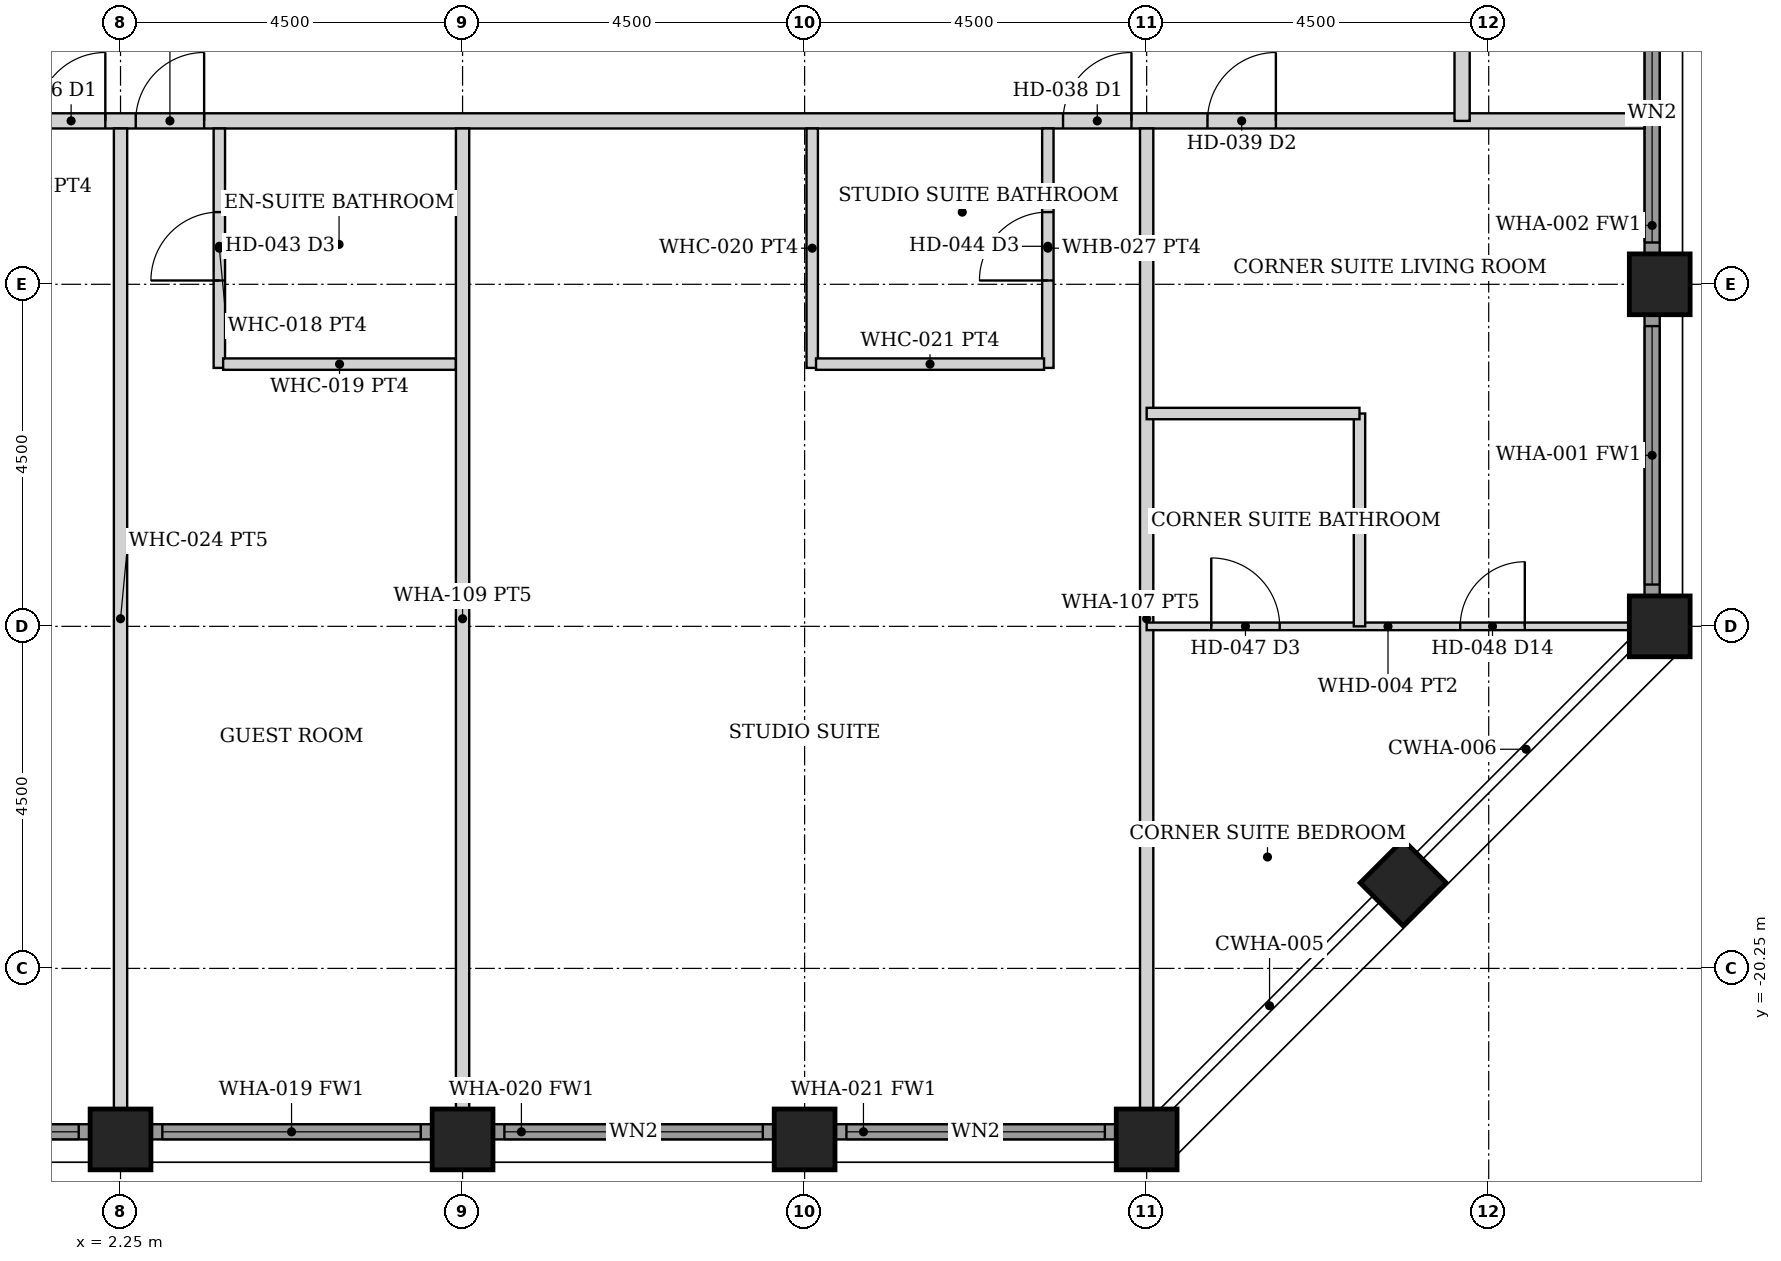
"""IFC4 building model, lengths in metres.
Left out: names, types, materials, properties, quantities, classifications, styles, units other than length and angle.
Written with IfcOpenShell. Run it as: python <this file> out.ifc"""

import sys

from ifc_helpers import new_model, si_unit, direction, frame, frame_2d, origin, origin_2d, place, context, subcontext, project, spatial, rectangle, hollow_rectangle, extrude, element, fill, save


model = new_model("IFC4")
c1 = context("Model", 3, precision=1e-05, world=origin(), true_north=direction((0.0, 1.0)))
c2 = subcontext(c1, "Body", "Model", "MODEL_VIEW")
j1 = project(units=[si_unit("LENGTHUNIT", "METRE"), si_unit("PLANEANGLEUNIT", "RADIAN")], contexts=[c1])
p1 = place(None, origin())
s1 = spatial("IfcSite", under=j1, at=p1, CompositionType="ELEMENT")
p2 = place(p1, origin())
s2 = spatial("IfcBuilding", under=s1, at=p2, CompositionType="ELEMENT")
p3 = place(p2, frame((0.0, 0.0, 150.8)))
s3 = spatial("IfcBuildingStorey", under=s2, at=p3, CompositionType="ELEMENT", Elevation=150.8)
for number, where, z_axis, x_axis in (
    (1, (22.5, -15.75, 0.0), (0.0, 0.0, 1.0), (1.0, 0.0, 0.0)),
    (2, (22.5, -11.25, 0.0), (0.0, 0.0, 1.0), (1.0, 0.0, 0.0)),
    (3, (2.25, -22.5, 0.0), (0.0, 0.0, 1.0), (0.0, 1.0, 0.0)),
    (4, (6.75, -22.5, 0.0), (0.0, 0.0, 1.0), (0.0, 1.0, 0.0)),
    (5, (11.25, -22.5, 0.0), (0.0, 0.0, 1.0), (0.0, 1.0, 0.0)),
    (6, (15.75, -22.5, 0.0), (0.0, 0.0, 1.0), (0.0, 1.0, 0.0)),
    (7, (19.125, -19.125, 0.0), (0.0, 0.0, 1.0), (0.707, -0.707, 0.0)),
):
    element("IfcColumn", number, at=place(p3, frame(where, z_axis=z_axis, x_axis=x_axis)), inside=s3, PredefinedType="COLUMN", context=c2, shape_type="SweptSolid", body=[
        extrude(hollow_rectangle(XDim=0.8, YDim=0.8, WallThickness=0.05, at=origin_2d()), origin(), (0.0, 0.0, 1.0), 3.6),
    ])
p4 = place(p3, frame((-1.845, -22.4, 0.0), z_axis=(0.0, 0.0, 1.0), x_axis=(1.0, 0.0, 0.0)))
e8 = element("IfcWall", 8, at=p4, inside=s3, PredefinedType="SOLIDWALL", context=c2, shape_type="SweptSolid", body=[
    extrude(rectangle(XDim=3.69, YDim=0.2, at=frame_2d((1.845, 0.0))), origin(), (0.0, 0.0, 1.0), 2.479),
])
p5 = place(p4, frame((0.145, 0.0, 0.3)))
e9 = element("IfcOpeningElement", 9, at=p5, cuts=e8, PredefinedType="OPENING", context=c2, shape_type="SweptSolid", body=[
    extrude(rectangle(XDim=3.4, YDim=2.029, at=frame_2d((1.7, 1.015))), frame((0.0, 0.11, 0.0), z_axis=(0.0, -1.0, 0.0), x_axis=(1.0, 0.0, 0.0)), (0.0, 0.0, 1.0), 0.22),
])
p6 = place(p3, frame((2.655, -22.4, 0.0), z_axis=(0.0, 0.0, 1.0), x_axis=(1.0, 0.0, 0.0)))
e10 = element("IfcWall", 10, at=p6, inside=s3, PredefinedType="SOLIDWALL", context=c2, shape_type="SweptSolid", body=[
    extrude(rectangle(XDim=3.69, YDim=0.2, at=frame_2d((1.845, 0.0))), origin(), (0.0, 0.0, 1.0), 2.479),
])
p7 = place(p6, frame((0.145, 0.0, 0.3)))
e11 = element("IfcOpeningElement", 11, at=p7, cuts=e10, PredefinedType="OPENING", context=c2, shape_type="SweptSolid", body=[
    extrude(rectangle(XDim=3.4, YDim=2.029, at=frame_2d((1.7, 1.015))), frame((0.0, 0.11, 0.0), z_axis=(0.0, -1.0, 0.0), x_axis=(1.0, 0.0, 0.0)), (0.0, 0.0, 1.0), 0.22),
])
p8 = place(p3, frame((7.155, -22.4, 0.0), z_axis=(0.0, 0.0, 1.0), x_axis=(1.0, 0.0, 0.0)))
e12 = element("IfcWall", 12, at=p8, inside=s3, PredefinedType="SOLIDWALL", context=c2, shape_type="SweptSolid", body=[
    extrude(rectangle(XDim=3.69, YDim=0.2, at=frame_2d((1.845, 0.0))), origin(), (0.0, 0.0, 1.0), 2.479),
])
p9 = place(p8, frame((0.145, 0.0, 0.3)))
e13 = element("IfcOpeningElement", 13, at=p9, cuts=e12, PredefinedType="OPENING", context=c2, shape_type="SweptSolid", body=[
    extrude(rectangle(XDim=3.4, YDim=2.029, at=frame_2d((1.7, 1.015))), frame((0.0, 0.11, 0.0), z_axis=(0.0, -1.0, 0.0), x_axis=(1.0, 0.0, 0.0)), (0.0, 0.0, 1.0), 0.22),
])
p10 = place(p3, frame((11.655, -22.4, 0.0), z_axis=(0.0, 0.0, 1.0), x_axis=(1.0, 0.0, 0.0)))
e14 = element("IfcWall", 14, at=p10, inside=s3, PredefinedType="SOLIDWALL", context=c2, shape_type="SweptSolid", body=[
    extrude(rectangle(XDim=3.69, YDim=0.2, at=frame_2d((1.845, 0.0))), origin(), (0.0, 0.0, 1.0), 2.479),
])
p11 = place(p10, frame((0.145, 0.0, 0.3)))
e15 = element("IfcOpeningElement", 15, at=p11, cuts=e14, PredefinedType="OPENING", context=c2, shape_type="SweptSolid", body=[
    extrude(rectangle(XDim=3.4, YDim=2.029, at=frame_2d((1.7, 1.015))), frame((0.0, 0.11, 0.0), z_axis=(0.0, -1.0, 0.0), x_axis=(1.0, 0.0, 0.0)), (0.0, 0.0, 1.0), 0.22),
])
p12 = place(p3, frame((22.4, -15.345, 0.0), z_axis=(0.0, 0.0, 1.0), x_axis=(0.0, 1.0, 0.0)))
e16 = element("IfcWall", 16, at=p12, inside=s3, PredefinedType="SOLIDWALL", context=c2, shape_type="SweptSolid", body=[
    extrude(rectangle(XDim=3.69, YDim=0.2, at=frame_2d((1.845, 0.0))), origin(), (0.0, 0.0, 1.0), 2.479),
])
p13 = place(p12, frame((0.145, 0.0, 0.3)))
e17 = element("IfcOpeningElement", 17, at=p13, cuts=e16, PredefinedType="OPENING", context=c2, shape_type="SweptSolid", body=[
    extrude(rectangle(XDim=3.4, YDim=2.029, at=frame_2d((1.7, 1.015))), frame((0.0, 0.11, 0.0), z_axis=(0.0, -1.0, 0.0), x_axis=(1.0, 0.0, 0.0)), (0.0, 0.0, 1.0), 0.22),
])
p14 = place(p3, frame((22.4, -10.845, 0.0), z_axis=(0.0, 0.0, 1.0), x_axis=(0.0, 1.0, 0.0)))
e18 = element("IfcWall", 18, at=p14, inside=s3, PredefinedType="SOLIDWALL", context=c2, shape_type="SweptSolid", body=[
    extrude(rectangle(XDim=3.69, YDim=0.2, at=frame_2d((1.845, 0.0))), origin(), (0.0, 0.0, 1.0), 2.479),
])
p15 = place(p14, frame((0.145, 0.0, 0.3)))
e19 = element("IfcOpeningElement", 19, at=p15, cuts=e18, PredefinedType="OPENING", context=c2, shape_type="SweptSolid", body=[
    extrude(rectangle(XDim=3.4, YDim=2.029, at=frame_2d((1.7, 1.015))), frame((0.0, 0.11, 0.0), z_axis=(0.0, -1.0, 0.0), x_axis=(1.0, 0.0, 0.0)), (0.0, 0.0, 1.0), 0.22),
])
p16 = place(p3, frame((-22.3, -9.1, 0.0), z_axis=(0.0, 0.0, 1.0), x_axis=(1.0, 0.0, 0.0)))
e20 = element("IfcWall", 20, at=p16, inside=s3, PredefinedType="PARTITIONING", context=c2, shape_type="SweptSolid", body=[
    extrude(rectangle(XDim=44.6, YDim=0.2, at=frame_2d((22.3, 0.0))), origin(), (0.0, 0.0, 1.0), 2.473),
])
p17 = place(p16, frame((6.75, 0.0, 0.0)))
e21 = element("IfcOpeningElement", 21, at=p17, cuts=e20, PredefinedType="OPENING", context=c2, shape_type="SweptSolid", body=[
    extrude(rectangle(XDim=0.9, YDim=2.1, at=frame_2d((0.45, 1.05))), frame((0.0, 0.11, 0.0), z_axis=(0.0, -1.0, 0.0), x_axis=(1.0, 0.0, 0.0)), (0.0, 0.0, 1.0), 0.22),
])
p18 = place(p16, frame((15.75, 0.0, 0.0)))
e22 = element("IfcOpeningElement", 22, at=p18, cuts=e20, PredefinedType="OPENING", context=c2, shape_type="SweptSolid", body=[
    extrude(rectangle(XDim=0.9, YDim=2.1, at=frame_2d((0.45, 1.05))), frame((0.0, 0.11, 0.0), z_axis=(0.0, -1.0, 0.0), x_axis=(1.0, 0.0, 0.0)), (0.0, 0.0, 1.0), 0.22),
])
p19 = place(p16, frame((23.45, 0.0, 0.0)))
e23 = element("IfcOpeningElement", 23, at=p19, cuts=e20, PredefinedType="OPENING", context=c2, shape_type="SweptSolid", body=[
    extrude(rectangle(XDim=0.9, YDim=2.1, at=frame_2d((0.45, 1.05))), frame((0.0, 0.11, 0.0), z_axis=(0.0, -1.0, 0.0), x_axis=(1.0, 0.0, 0.0)), (0.0, 0.0, 1.0), 0.22),
])
p20 = place(p16, frame((24.75, 0.0, 0.0)))
e24 = element("IfcOpeningElement", 24, at=p20, cuts=e20, PredefinedType="OPENING", context=c2, shape_type="SweptSolid", body=[
    extrude(rectangle(XDim=0.9, YDim=2.1, at=frame_2d((0.45, 1.05))), frame((0.0, 0.11, 0.0), z_axis=(0.0, -1.0, 0.0), x_axis=(1.0, 0.0, 0.0)), (0.0, 0.0, 1.0), 0.22),
])
p21 = place(p16, frame((36.95, 0.0, 0.0)))
e25 = element("IfcOpeningElement", 25, at=p21, cuts=e20, PredefinedType="OPENING", context=c2, shape_type="SweptSolid", body=[
    extrude(rectangle(XDim=0.9, YDim=2.1, at=frame_2d((0.45, 1.05))), frame((0.0, 0.11, 0.0), z_axis=(0.0, -1.0, 0.0), x_axis=(1.0, 0.0, 0.0)), (0.0, 0.0, 1.0), 0.22),
])
p22 = place(p16, frame((38.85, 0.0, 0.0)))
e26 = element("IfcOpeningElement", 26, at=p22, cuts=e20, PredefinedType="OPENING", context=c2, shape_type="SweptSolid", body=[
    extrude(rectangle(XDim=0.9, YDim=2.1, at=frame_2d((0.45, 1.05))), frame((0.0, 0.11, 0.0), z_axis=(0.0, -1.0, 0.0), x_axis=(1.0, 0.0, 0.0)), (0.0, 0.0, 1.0), 0.22),
])
p23 = place(p16, frame((4.85, 0.0, 0.0)))
e27 = element("IfcOpeningElement", 27, at=p23, cuts=e20, PredefinedType="OPENING", context=c2, shape_type="SweptSolid", body=[
    extrude(rectangle(XDim=0.9, YDim=2.1, at=frame_2d((0.45, 1.05))), frame((0.0, 0.11, 0.0), z_axis=(0.0, -1.0, 0.0), x_axis=(1.0, 0.0, 0.0)), (0.0, 0.0, 1.0), 0.22),
])
p24 = place(p3, frame((19.9, -9.1, 0.0), z_axis=(0.0, 0.0, 1.0), x_axis=(0.0, 1.0, 0.0)))
e28 = element("IfcWall", 28, at=p24, inside=s3, PredefinedType="PARTITIONING", context=c2, shape_type="SweptSolid", body=[
    extrude(rectangle(XDim=6.9, YDim=0.2, at=frame_2d((3.45, 0.0))), origin(), (0.0, 0.0, 1.0), 2.473),
])
p25 = place(p24, frame((3.075, 0.0, 0.0)))
e29 = element("IfcOpeningElement", 29, at=p25, cuts=e28, PredefinedType="OPENING", context=c2, shape_type="SweptSolid", body=[
    extrude(rectangle(XDim=0.8, YDim=2.1, at=frame_2d((0.4, 1.05))), frame((0.0, 0.11, 0.0), z_axis=(0.0, -1.0, 0.0), x_axis=(1.0, 0.0, 0.0)), (0.0, 0.0, 1.0), 0.22),
])
p26 = place(p3, frame((3.55, -12.35, 0.0), z_axis=(0.0, 0.0, 1.0), x_axis=(0.0, 1.0, 0.0)))
e30 = element("IfcWall", 30, at=p26, inside=s3, PredefinedType="PARTITIONING", context=c2, shape_type="SweptSolid", body=[
    extrude(rectangle(XDim=3.15, YDim=0.15, at=frame_2d((1.575, 0.0))), origin(), (0.0, 0.0, 1.0), 2.473),
])
p27 = place(p26, frame((1.15, 0.0, 0.0)))
e31 = element("IfcOpeningElement", 31, at=p27, cuts=e30, PredefinedType="OPENING", context=c2, shape_type="SweptSolid", body=[
    extrude(rectangle(XDim=0.9, YDim=2.1, at=frame_2d((0.45, 1.05))), frame((0.0, 0.085, 0.0), z_axis=(0.0, -1.0, 0.0), x_axis=(1.0, 0.0, 0.0)), (0.0, 0.0, 1.0), 0.17),
])
p28 = place(p3, frame((3.6, -12.3, 0.0), z_axis=(0.0, 0.0, 1.0), x_axis=(1.0, 0.0, 0.0)))
e32 = element("IfcWall", 32, at=p28, inside=s3, PredefinedType="PARTITIONING", context=c2, shape_type="SweptSolid", body=[
    extrude(rectangle(XDim=3.062, YDim=0.15, at=frame_2d((1.531, 0.0))), origin(), (0.0, 0.0, 1.0), 2.473),
])
p29 = place(p3, frame((14.45, -12.35, 0.0), z_axis=(0.0, 0.0, 1.0), x_axis=(0.0, 1.0, 0.0)))
e33 = element("IfcWall", 33, at=p29, inside=s3, PredefinedType="PARTITIONING", context=c2, shape_type="SweptSolid", body=[
    extrude(rectangle(XDim=3.15, YDim=0.15, at=frame_2d((1.575, 0.0))), origin(), (0.0, 0.0, 1.0), 2.473),
])
p30 = place(p29, frame((1.15, 0.0, 0.0)))
e34 = element("IfcOpeningElement", 34, at=p30, cuts=e33, PredefinedType="OPENING", context=c2, shape_type="SweptSolid", body=[
    extrude(rectangle(XDim=0.9, YDim=2.1, at=frame_2d((0.45, 1.05))), frame((0.0, 0.085, 0.0), z_axis=(0.0, -1.0, 0.0), x_axis=(1.0, 0.0, 0.0)), (0.0, 0.0, 1.0), 0.17),
])
p31 = place(p3, frame((11.35, -12.35, 0.0), z_axis=(0.0, 0.0, 1.0), x_axis=(0.0, 1.0, 0.0)))
e35 = element("IfcWall", 35, at=p31, inside=s3, PredefinedType="PARTITIONING", context=c2, shape_type="SweptSolid", body=[
    extrude(rectangle(XDim=3.15, YDim=0.15, at=frame_2d((1.575, 0.0))), origin(), (0.0, 0.0, 1.0), 2.473),
])
p32 = place(p3, frame((11.4, -12.3, 0.0), z_axis=(0.0, 0.0, 1.0), x_axis=(1.0, 0.0, 0.0)))
e36 = element("IfcWall", 36, at=p32, inside=s3, PredefinedType="PARTITIONING", context=c2, shape_type="SweptSolid", body=[
    extrude(rectangle(XDim=3.0, YDim=0.15, at=frame_2d((1.5, 0.0))), origin(), (0.0, 0.0, 1.0), 2.473),
])
for number, where, z_axis, x_axis in (
    (37, (2.25, -22.1, 0.0), (0.0, 0.0, 1.0), (0.0, 1.0, 0.0)),
    (38, (6.75, -22.1, 0.0), (0.0, 0.0, 1.0), (0.0, 1.0, 0.0)),
    (39, (15.75, -22.1, 0.0), (0.0, 0.0, 1.0), (0.0, 1.0, 0.0)),
):
    element("IfcWall", number, at=place(p3, frame(where, z_axis=z_axis, x_axis=x_axis)), inside=s3, PredefinedType="PARTITIONING", context=c2, shape_type="SweptSolid", body=[
        extrude(rectangle(XDim=12.9, YDim=0.175, at=frame_2d((6.45, 0.0))), origin(), (0.0, 0.0, 1.0), 2.473),
    ])
p33 = place(p3, frame((15.75, -15.75, 0.0), z_axis=(0.0, 0.0, 1.0), x_axis=(1.0, 0.0, 0.0)))
e40 = element("IfcWall", 40, at=p33, inside=s3, PredefinedType="PARTITIONING", context=c2, shape_type="SweptSolid", body=[
    extrude(rectangle(XDim=6.35, YDim=0.1, at=frame_2d((3.175, 0.0))), origin(), (0.0, 0.0, 1.0), 2.473),
])
p34 = place(p33, frame((4.125, 0.0, 0.0)))
e41 = element("IfcOpeningElement", 41, at=p34, cuts=e40, PredefinedType="OPENING", context=c2, shape_type="SweptSolid", body=[
    extrude(rectangle(XDim=0.85, YDim=2.1, at=frame_2d((0.425, 1.05))), frame((0.0, 0.06, 0.0), z_axis=(0.0, -1.0, 0.0), x_axis=(1.0, 0.0, 0.0)), (0.0, 0.0, 1.0), 0.12),
])
p35 = place(p33, frame((0.85, 0.0, 0.0)))
e42 = element("IfcOpeningElement", 42, at=p35, cuts=e40, PredefinedType="OPENING", context=c2, shape_type="SweptSolid", body=[
    extrude(rectangle(XDim=0.9, YDim=2.1, at=frame_2d((0.45, 1.05))), frame((0.0, 0.06, 0.0), z_axis=(0.0, -1.0, 0.0), x_axis=(1.0, 0.0, 0.0)), (0.0, 0.0, 1.0), 0.12),
])
for number, where, z_axis, x_axis in (
    (43, (18.55, -15.75, 0.0), (0.0, 0.0, 1.0), (0.0, 1.0, 0.0)),
    (44, (15.75, -12.95, 0.0), (0.0, 0.0, 1.0), (1.0, 0.0, 0.0)),
):
    element("IfcWall", number, at=place(p3, frame(where, z_axis=z_axis, x_axis=x_axis)), inside=s3, PredefinedType="PARTITIONING", context=c2, shape_type="SweptSolid", body=[
        extrude(rectangle(XDim=2.8, YDim=0.15, at=frame_2d((1.4, 0.0))), origin(), (0.0, 0.0, 1.0), 2.473),
    ])
p36 = place(p5, origin())
e45 = element("IfcWindow", 45, at=p36, inside=s3, PartitioningType="SINGLE_PANEL", PredefinedType="WINDOW", context=c2, shape_type="SweptSolid", body=[
    extrude(rectangle(XDim=3.4, YDim=2.029, at=frame_2d((1.7, 1.015))), frame((0.0, 0.03, 0.0), z_axis=(0.0, -1.0, 0.0), x_axis=(1.0, 0.0, 0.0)), (0.0, 0.0, 1.0), 0.06),
])
fill(e9, e45)
p37 = place(p7, origin())
e46 = element("IfcWindow", 46, at=p37, inside=s3, PartitioningType="SINGLE_PANEL", PredefinedType="WINDOW", context=c2, shape_type="SweptSolid", body=[
    extrude(rectangle(XDim=3.4, YDim=2.029, at=frame_2d((1.7, 1.015))), frame((0.0, 0.03, 0.0), z_axis=(0.0, -1.0, 0.0), x_axis=(1.0, 0.0, 0.0)), (0.0, 0.0, 1.0), 0.06),
])
fill(e11, e46)
p38 = place(p9, origin())
e47 = element("IfcWindow", 47, at=p38, inside=s3, PartitioningType="SINGLE_PANEL", PredefinedType="WINDOW", context=c2, shape_type="SweptSolid", body=[
    extrude(rectangle(XDim=3.4, YDim=2.029, at=frame_2d((1.7, 1.015))), frame((0.0, 0.03, 0.0), z_axis=(0.0, -1.0, 0.0), x_axis=(1.0, 0.0, 0.0)), (0.0, 0.0, 1.0), 0.06),
])
fill(e13, e47)
p39 = place(p11, origin())
e48 = element("IfcWindow", 48, at=p39, inside=s3, PartitioningType="SINGLE_PANEL", PredefinedType="WINDOW", context=c2, shape_type="SweptSolid", body=[
    extrude(rectangle(XDim=3.4, YDim=2.029, at=frame_2d((1.7, 1.015))), frame((0.0, 0.03, 0.0), z_axis=(0.0, -1.0, 0.0), x_axis=(1.0, 0.0, 0.0)), (0.0, 0.0, 1.0), 0.06),
])
fill(e15, e48)
p40 = place(p13, origin())
e49 = element("IfcWindow", 49, at=p40, inside=s3, PartitioningType="SINGLE_PANEL", PredefinedType="WINDOW", context=c2, shape_type="SweptSolid", body=[
    extrude(rectangle(XDim=3.4, YDim=2.029, at=frame_2d((1.7, 1.015))), frame((0.0, 0.03, 0.0), z_axis=(0.0, -1.0, 0.0), x_axis=(1.0, 0.0, 0.0)), (0.0, 0.0, 1.0), 0.06),
])
fill(e17, e49)
p41 = place(p15, origin())
e50 = element("IfcWindow", 50, at=p41, inside=s3, PartitioningType="SINGLE_PANEL", PredefinedType="WINDOW", context=c2, shape_type="SweptSolid", body=[
    extrude(rectangle(XDim=3.4, YDim=2.029, at=frame_2d((1.7, 1.015))), frame((0.0, 0.03, 0.0), z_axis=(0.0, -1.0, 0.0), x_axis=(1.0, 0.0, 0.0)), (0.0, 0.0, 1.0), 0.06),
])
fill(e19, e50)
p42 = place(p19, origin())
e51 = element("IfcDoor", 51, at=p42, inside=s3, OperationType="SINGLE_SWING_RIGHT", PredefinedType="DOOR", context=c2, shape_type="SweptSolid", body=[
    extrude(rectangle(XDim=0.9, YDim=2.1, at=frame_2d((0.45, 1.05))), frame((0.0, 0.025, 0.0), z_axis=(0.0, -1.0, 0.0), x_axis=(1.0, 0.0, 0.0)), (0.0, 0.0, 1.0), 0.05),
])
fill(e23, e51)
p43 = place(p20, origin())
e52 = element("IfcDoor", 52, at=p43, inside=s3, OperationType="SINGLE_SWING_RIGHT", PredefinedType="DOOR", context=c2, shape_type="SweptSolid", body=[
    extrude(rectangle(XDim=0.9, YDim=2.1, at=frame_2d((0.45, 1.05))), frame((0.0, 0.025, 0.0), z_axis=(0.0, -1.0, 0.0), x_axis=(1.0, 0.0, 0.0)), (0.0, 0.0, 1.0), 0.05),
])
fill(e24, e52)
p44 = place(p27, origin())
e53 = element("IfcDoor", 53, at=p44, inside=s3, OperationType="SINGLE_SWING_LEFT", PredefinedType="DOOR", context=c2, shape_type="SweptSolid", body=[
    extrude(rectangle(XDim=0.9, YDim=2.1, at=frame_2d((0.45, 1.05))), frame((0.0, 0.025, 0.0), z_axis=(0.0, -1.0, 0.0), x_axis=(1.0, 0.0, 0.0)), (0.0, 0.0, 1.0), 0.05),
])
fill(e31, e53)
p45 = place(p21, origin())
e54 = element("IfcDoor", 54, at=p45, inside=s3, OperationType="SINGLE_SWING_RIGHT", PredefinedType="DOOR", context=c2, shape_type="SweptSolid", body=[
    extrude(rectangle(XDim=0.9, YDim=2.1, at=frame_2d((0.45, 1.05))), frame((0.0, 0.025, 0.0), z_axis=(0.0, -1.0, 0.0), x_axis=(1.0, 0.0, 0.0)), (0.0, 0.0, 1.0), 0.05),
])
fill(e25, e54)
p46 = place(p30, origin())
e55 = element("IfcDoor", 55, at=p46, inside=s3, OperationType="SINGLE_SWING_LEFT", PredefinedType="DOOR", context=c2, shape_type="SweptSolid", body=[
    extrude(rectangle(XDim=0.9, YDim=2.1, at=frame_2d((0.45, 1.05))), frame((0.0, 0.025, 0.0), z_axis=(0.0, -1.0, 0.0), x_axis=(1.0, 0.0, 0.0)), (0.0, 0.0, 1.0), 0.05),
])
fill(e34, e55)
p47 = place(p22, origin())
e56 = element("IfcDoor", 56, at=p47, inside=s3, OperationType="SINGLE_SWING_RIGHT", PredefinedType="DOOR", context=c2, shape_type="SweptSolid", body=[
    extrude(rectangle(XDim=0.9, YDim=2.1, at=frame_2d((0.45, 1.05))), frame((0.0, 0.025, 0.0), z_axis=(0.0, -1.0, 0.0), x_axis=(1.0, 0.0, 0.0)), (0.0, 0.0, 1.0), 0.05),
])
fill(e26, e56)
p48 = place(p34, origin())
e57 = element("IfcDoor", 57, at=p48, inside=s3, OperationType="SINGLE_SWING_RIGHT", PredefinedType="DOOR", context=c2, shape_type="SweptSolid", body=[
    extrude(rectangle(XDim=0.85, YDim=2.1, at=frame_2d((0.425, 1.05))), frame((0.0, 0.025, 0.0), z_axis=(0.0, -1.0, 0.0), x_axis=(1.0, 0.0, 0.0)), (0.0, 0.0, 1.0), 0.05),
])
fill(e41, e57)
p49 = place(p35, origin())
e58 = element("IfcDoor", 58, at=p49, inside=s3, OperationType="SINGLE_SWING_LEFT", PredefinedType="DOOR", context=c2, shape_type="SweptSolid", body=[
    extrude(rectangle(XDim=0.9, YDim=2.1, at=frame_2d((0.45, 1.05))), frame((0.0, 0.025, 0.0), z_axis=(0.0, -1.0, 0.0), x_axis=(1.0, 0.0, 0.0)), (0.0, 0.0, 1.0), 0.05),
])
fill(e42, e58)
save(model, sys.argv[1])
